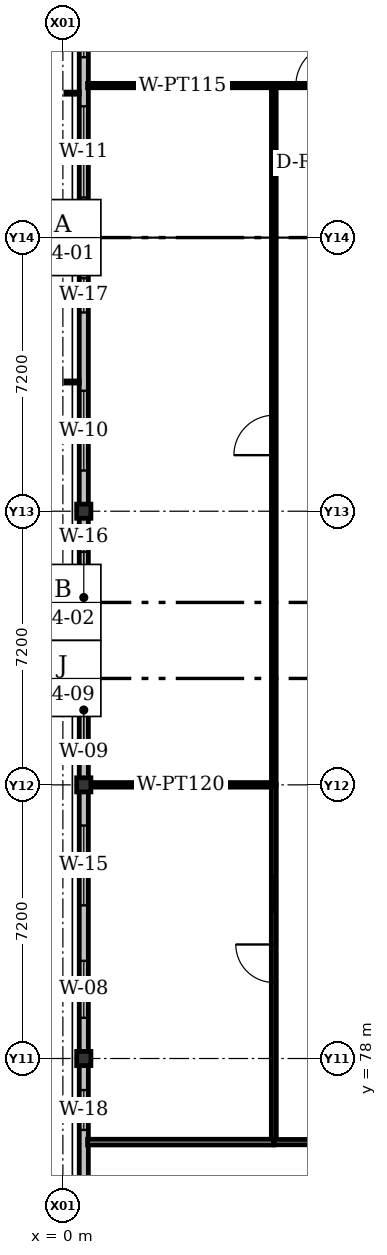
"""IFC4 building model, lengths in metres.
Left out: names, types, materials, properties, quantities, classifications, styles, units other than length and angle.
Written with IfcOpenShell. Run it as: python <this file> out.ifc"""

import sys

from ifc_helpers import new_model, si_unit, direction, frame, frame_2d, origin, origin_2d, place, context, subcontext, project, spatial, rectangle, i_section, extrude, element, fill, save


model = new_model("IFC4")
c1 = context("Model", 3, precision=1e-05, world=origin(), true_north=direction((0.0, 1.0)))
c2 = subcontext(c1, "Body", "Model", "MODEL_VIEW")
j1 = project(units=[si_unit("LENGTHUNIT", "METRE"), si_unit("PLANEANGLEUNIT", "RADIAN")], contexts=[c1])
p1 = place(None, origin())
s1 = spatial("IfcSite", under=j1, at=p1, CompositionType="ELEMENT")
p2 = place(p1, origin())
s2 = spatial("IfcBuilding", under=s1, at=p2, CompositionType="ELEMENT")
p3 = place(p2, frame((0.0, 0.0, 22.5)))
s3 = spatial("IfcBuildingStorey", under=s2, at=p3, CompositionType="ELEMENT", Elevation=22.5)
for number, where, z_axis, x_axis in (
    (1, (0.55, 78.0, 0.0), (0.0, 0.0, 1.0), (1.0, 0.0, 0.0)),
    (2, (0.55, 85.2, 0.0), (0.0, 0.0, 1.0), (1.0, 0.0, 0.0)),
    (3, (0.55, 92.4, 0.0), (0.0, 0.0, 1.0), (1.0, 0.0, 0.0)),
    (4, (0.55, 99.6, 0.0), (0.0, 0.0, 1.0), (1.0, 0.0, 0.0)),
):
    element("IfcColumn", number, at=place(p3, frame(where, z_axis=z_axis, x_axis=x_axis)), inside=s3, PredefinedType="COLUMN", context=c2, shape_type="SweptSolid", body=[
        extrude(i_section(OverallWidth=0.374, OverallDepth=0.372, WebThickness=0.016, FlangeThickness=0.026, FilletRadius=0.015, at=origin_2d()), origin(), (0.0, 0.0, 1.0), 4.2),
    ])
p4 = place(p3, frame((0.55, 70.5, 0.0), z_axis=(0.0, 0.0, 1.0), x_axis=(0.0, 1.0, 0.0)))
e5 = element("IfcWall", 5, at=p4, inside=s3, PredefinedType="SOLIDWALL", context=c2, shape_type="SweptSolid", body=[
    extrude(rectangle(XDim=7.5, YDim=0.24, at=frame_2d((3.75, 0.0))), origin(), (0.0, 0.0, 1.0), 3.557),
])
p5 = place(p4, frame((2.305, 0.0, 0.92)))
e6 = element("IfcOpeningElement", 6, at=p5, cuts=e5, PredefinedType="OPENING", context=c2, shape_type="SweptSolid", body=[
    extrude(rectangle(XDim=1.2, YDim=1.55, at=frame_2d((0.6, 0.775))), frame((0.0, 0.12, 0.0), z_axis=(0.0, -1.0, 0.0), x_axis=(1.0, 0.0, 0.0)), (0.0, 0.0, 1.0), 0.24),
])
p6 = place(p4, frame((5.62, 0.0, 0.92)))
e7 = element("IfcOpeningElement", 7, at=p6, cuts=e5, PredefinedType="OPENING", context=c2, shape_type="SweptSolid", body=[
    extrude(rectangle(XDim=1.05, YDim=1.3, at=frame_2d((0.525, 0.65))), frame((0.0, 0.12, 0.0), z_axis=(0.0, -1.0, 0.0), x_axis=(1.0, 0.0, 0.0)), (0.0, 0.0, 1.0), 0.24),
])
p7 = place(p3, frame((0.55, 78.0, 0.0), z_axis=(0.0, 0.0, 1.0), x_axis=(0.0, 1.0, 0.0)))
e8 = element("IfcWall", 8, at=p7, inside=s3, PredefinedType="SOLIDWALL", context=c2, shape_type="SweptSolid", body=[
    extrude(rectangle(XDim=7.2, YDim=0.24, at=frame_2d((3.6, 0.0))), origin(), (0.0, 0.0, 1.0), 3.557),
])
p8 = place(p7, frame((1.07, 0.0, 0.92)))
e9 = element("IfcOpeningElement", 9, at=p8, cuts=e8, PredefinedType="OPENING", context=c2, shape_type="SweptSolid", body=[
    extrude(rectangle(XDim=1.5, YDim=1.55, at=frame_2d((0.75, 0.775))), frame((0.0, 0.12, 0.0), z_axis=(0.0, -1.0, 0.0), x_axis=(1.0, 0.0, 0.0)), (0.0, 0.0, 1.0), 0.24),
])
p9 = place(p7, frame((4.03, 0.0, 0.92)))
e10 = element("IfcOpeningElement", 10, at=p9, cuts=e8, PredefinedType="OPENING", context=c2, shape_type="SweptSolid", body=[
    extrude(rectangle(XDim=2.1, YDim=1.7, at=frame_2d((1.05, 0.85))), frame((0.0, 0.12, 0.0), z_axis=(0.0, -1.0, 0.0), x_axis=(1.0, 0.0, 0.0)), (0.0, 0.0, 1.0), 0.24),
])
p10 = place(p3, frame((0.55, 85.2, 0.0), z_axis=(0.0, 0.0, 1.0), x_axis=(0.0, 1.0, 0.0)))
e11 = element("IfcWall", 11, at=p10, inside=s3, PredefinedType="SOLIDWALL", context=c2, shape_type="SweptSolid", body=[
    extrude(rectangle(XDim=7.2, YDim=0.24, at=frame_2d((3.6, 0.0))), origin(), (0.0, 0.0, 1.0), 3.557),
])
p11 = place(p10, frame((1.07, 0.0, 0.92)))
e12 = element("IfcOpeningElement", 12, at=p11, cuts=e11, PredefinedType="OPENING", context=c2, shape_type="SweptSolid", body=[
    extrude(rectangle(XDim=1.8, YDim=1.55, at=frame_2d((0.9, 0.775))), frame((0.0, 0.12, 0.0), z_axis=(0.0, -1.0, 0.0), x_axis=(1.0, 0.0, 0.0)), (0.0, 0.0, 1.0), 0.24),
])
p12 = place(p10, frame((3.73, 0.0, 0.92)))
e13 = element("IfcOpeningElement", 13, at=p12, cuts=e11, PredefinedType="OPENING", context=c2, shape_type="SweptSolid", body=[
    extrude(rectangle(XDim=2.4, YDim=1.7, at=frame_2d((1.2, 0.85))), frame((0.0, 0.12, 0.0), z_axis=(0.0, -1.0, 0.0), x_axis=(1.0, 0.0, 0.0)), (0.0, 0.0, 1.0), 0.24),
])
p13 = place(p3, frame((0.55, 92.4, 0.0), z_axis=(0.0, 0.0, 1.0), x_axis=(0.0, 1.0, 0.0)))
e14 = element("IfcWall", 14, at=p13, inside=s3, PredefinedType="SOLIDWALL", context=c2, shape_type="SweptSolid", body=[
    extrude(rectangle(XDim=7.2, YDim=0.24, at=frame_2d((3.6, 0.0))), origin(), (0.0, 0.0, 1.0), 3.557),
])
p14 = place(p13, frame((1.07, 0.0, 0.92)))
e15 = element("IfcOpeningElement", 15, at=p14, cuts=e14, PredefinedType="OPENING", context=c2, shape_type="SweptSolid", body=[
    extrude(rectangle(XDim=2.1, YDim=1.55, at=frame_2d((1.05, 0.775))), frame((0.0, 0.12, 0.0), z_axis=(0.0, -1.0, 0.0), x_axis=(1.0, 0.0, 0.0)), (0.0, 0.0, 1.0), 0.24),
])
p15 = place(p13, frame((5.23, 0.0, 0.92)))
e16 = element("IfcOpeningElement", 16, at=p15, cuts=e14, PredefinedType="OPENING", context=c2, shape_type="SweptSolid", body=[
    extrude(rectangle(XDim=0.9, YDim=1.3, at=frame_2d((0.45, 0.65))), frame((0.0, 0.12, 0.0), z_axis=(0.0, -1.0, 0.0), x_axis=(1.0, 0.0, 0.0)), (0.0, 0.0, 1.0), 0.24),
])
p16 = place(p3, frame((0.55, 99.6, 0.0), z_axis=(0.0, 0.0, 1.0), x_axis=(0.0, 1.0, 0.0)))
e17 = element("IfcWall", 17, at=p16, inside=s3, PredefinedType="SOLIDWALL", context=c2, shape_type="SweptSolid", body=[
    extrude(rectangle(XDim=7.2, YDim=0.24, at=frame_2d((3.6, 0.0))), origin(), (0.0, 0.0, 1.0), 3.557),
])
p17 = place(p16, frame((1.055, 0.0, 0.92)))
e18 = element("IfcOpeningElement", 18, at=p17, cuts=e17, PredefinedType="OPENING", context=c2, shape_type="SweptSolid", body=[
    extrude(rectangle(XDim=2.4, YDim=1.55, at=frame_2d((1.2, 0.775))), frame((0.0, 0.12, 0.0), z_axis=(0.0, -1.0, 0.0), x_axis=(1.0, 0.0, 0.0)), (0.0, 0.0, 1.0), 0.24),
])
p18 = place(p16, frame((4.745, 0.0, 0.92)))
e19 = element("IfcOpeningElement", 19, at=p18, cuts=e17, PredefinedType="OPENING", context=c2, shape_type="SweptSolid", body=[
    extrude(rectangle(XDim=1.2, YDim=1.4, at=frame_2d((0.6, 0.7))), frame((0.0, 0.12, 0.0), z_axis=(0.0, -1.0, 0.0), x_axis=(1.0, 0.0, 0.0)), (0.0, 0.0, 1.0), 0.24),
])
p19 = place(p3, frame((5.55, 75.8, 0.0), z_axis=(0.0, 0.0, 1.0), x_axis=(0.0, 1.0, 0.0)))
e20 = element("IfcWall", 20, at=p19, inside=s3, PredefinedType="PARTITIONING", context=c2, shape_type="SweptSolid", body=[
    extrude(rectangle(XDim=9.4, YDim=0.13, at=frame_2d((4.7, 0.0))), origin(), (0.0, 0.0, 1.0), 3.277),
])
p20 = place(p19, frame((4.2, 0.0, 0.0)))
e21 = element("IfcOpeningElement", 21, at=p20, cuts=e20, PredefinedType="OPENING", context=c2, shape_type="SweptSolid", body=[
    extrude(rectangle(XDim=1.0, YDim=2.2, at=frame_2d((0.5, 1.1))), frame((0.0, 0.065, 0.0), z_axis=(0.0, -1.0, 0.0), x_axis=(1.0, 0.0, 0.0)), (0.0, 0.0, 1.0), 0.13),
])
p21 = place(p19, frame((6.05, 0.0, 0.92)))
e22 = element("IfcOpeningElement", 22, at=p21, cuts=e20, PredefinedType="OPENING", context=c2, shape_type="SweptSolid", body=[
    extrude(rectangle(XDim=0.95, YDim=1.1, at=frame_2d((0.475, 0.55))), frame((0.0, 0.065, 0.0), z_axis=(0.0, -1.0, 0.0), x_axis=(1.0, 0.0, 0.0)), (0.0, 0.0, 1.0), 0.13),
])
p22 = place(p3, frame((5.55, 85.2, 0.0), z_axis=(0.0, 0.0, 1.0), x_axis=(0.0, 1.0, 0.0)))
e23 = element("IfcWall", 23, at=p22, inside=s3, PredefinedType="PARTITIONING", context=c2, shape_type="SweptSolid", body=[
    extrude(rectangle(XDim=18.4, YDim=0.125, at=frame_2d((9.2, 0.0))), origin(), (0.0, 0.0, 1.0), 3.277),
])
p23 = place(p22, frame((8.675, 0.0, 0.0)))
e24 = element("IfcOpeningElement", 24, at=p23, cuts=e23, PredefinedType="OPENING", context=c2, shape_type="SweptSolid", body=[
    extrude(rectangle(XDim=1.05, YDim=2.2, at=frame_2d((0.525, 1.1))), frame((0.0, 0.062, 0.0), z_axis=(0.0, -1.0, 0.0), x_axis=(1.0, 0.0, 0.0)), (0.0, 0.0, 1.0), 0.125),
])
p24 = place(p22, frame((10.575, 0.0, 0.92)))
e25 = element("IfcOpeningElement", 25, at=p24, cuts=e23, PredefinedType="OPENING", context=c2, shape_type="SweptSolid", body=[
    extrude(rectangle(XDim=1.1, YDim=1.1, at=frame_2d((0.55, 0.55))), frame((0.0, 0.062, 0.0), z_axis=(0.0, -1.0, 0.0), x_axis=(1.0, 0.0, 0.0)), (0.0, 0.0, 1.0), 0.125),
])
p25 = place(p3, frame((0.65, 85.2, 0.0), z_axis=(0.0, 0.0, 1.0), x_axis=(1.0, 0.0, 0.0)))
e26 = element("IfcWall", 26, at=p25, inside=s3, PredefinedType="PARTITIONING", context=c2, shape_type="SweptSolid", body=[
    extrude(rectangle(XDim=4.9, YDim=0.12, at=frame_2d((2.45, 0.0))), origin(), (0.0, 0.0, 1.0), 3.277),
])
p26 = place(p3, frame((0.65, 103.6, 0.0), z_axis=(0.0, 0.0, 1.0), x_axis=(1.0, 0.0, 0.0)))
e27 = element("IfcWall", 27, at=p26, inside=s3, PredefinedType="PARTITIONING", context=c2, shape_type="SweptSolid", body=[
    extrude(rectangle(XDim=7.2, YDim=0.115, at=frame_2d((3.6, 0.0))), origin(), (0.0, 0.0, 1.0), 3.507),
])
p27 = place(p26, frame((5.48, 0.0, 0.0)))
e28 = element("IfcOpeningElement", 28, at=p27, cuts=e27, PredefinedType="OPENING", context=c2, shape_type="SweptSolid", body=[
    extrude(rectangle(XDim=1.1, YDim=2.2, at=frame_2d((0.55, 1.1))), frame((0.0, 0.058, 0.0), z_axis=(0.0, -1.0, 0.0), x_axis=(1.0, 0.0, 0.0)), (0.0, 0.0, 1.0), 0.115),
])
p28 = place(p3, frame((0.65, 75.8, 0.0), z_axis=(0.0, 0.0, 1.0), x_axis=(1.0, 0.0, 0.0)))
e29 = element("IfcWall", 29, at=p28, inside=s3, PredefinedType="PARTITIONING", context=c2, shape_type="SweptSolid", body=[
    extrude(rectangle(XDim=4.9, YDim=0.15, at=frame_2d((2.45, 0.0))), origin(), (0.0, 0.0, 1.0), 3.95),
])
p29 = place(p3, frame((19.75, 75.8, 0.0), z_axis=(0.0, 0.0, 1.0), x_axis=(-1.0, 0.0, 0.0)))
e30 = element("IfcWall", 30, at=p29, inside=s3, PredefinedType="PARTITIONING", context=c2, shape_type="SweptSolid", body=[
    extrude(rectangle(XDim=14.2, YDim=0.14, at=frame_2d((7.1, 0.0))), origin(), (0.0, 0.0, 1.0), 3.507),
])
p30 = place(p29, frame((8.02, 0.0, 0.0)))
e31 = element("IfcOpeningElement", 31, at=p30, cuts=e30, PredefinedType="OPENING", context=c2, shape_type="SweptSolid", body=[
    extrude(rectangle(XDim=1.06, YDim=2.25, at=frame_2d((0.53, 1.125))), frame((0.0, 0.07, 0.0), z_axis=(0.0, -1.0, 0.0), x_axis=(1.0, 0.0, 0.0)), (0.0, 0.0, 1.0), 0.14),
])
p31 = place(p29, frame((9.93, 0.0, 0.92)))
e32 = element("IfcOpeningElement", 32, at=p31, cuts=e30, PredefinedType="OPENING", context=c2, shape_type="SweptSolid", body=[
    extrude(rectangle(XDim=0.9, YDim=1.2, at=frame_2d((0.45, 0.6))), frame((0.0, 0.07, 0.0), z_axis=(0.0, -1.0, 0.0), x_axis=(1.0, 0.0, 0.0)), (0.0, 0.0, 1.0), 0.14),
])
p32 = place(p6, origin())
e33 = element("IfcWindow", 33, at=p32, inside=s3, PartitioningType="SINGLE_PANEL", PredefinedType="WINDOW", context=c2, shape_type="SweptSolid", body=[
    extrude(rectangle(XDim=1.05, YDim=1.3, at=frame_2d((0.525, 0.65))), frame((0.0, 0.03, 0.0), z_axis=(0.0, -1.0, 0.0), x_axis=(1.0, 0.0, 0.0)), (0.0, 0.0, 1.0), 0.06),
])
fill(e7, e33)
p33 = place(p8, origin())
e34 = element("IfcWindow", 34, at=p33, inside=s3, PartitioningType="SINGLE_PANEL", PredefinedType="WINDOW", context=c2, shape_type="SweptSolid", body=[
    extrude(rectangle(XDim=1.5, YDim=1.55, at=frame_2d((0.75, 0.775))), frame((0.0, 0.03, 0.0), z_axis=(0.0, -1.0, 0.0), x_axis=(1.0, 0.0, 0.0)), (0.0, 0.0, 1.0), 0.06),
])
fill(e9, e34)
p34 = place(p9, origin())
e35 = element("IfcWindow", 35, at=p34, inside=s3, PartitioningType="DOUBLE_PANEL_VERTICAL", PredefinedType="WINDOW", context=c2, shape_type="SweptSolid", body=[
    extrude(rectangle(XDim=2.1, YDim=1.7, at=frame_2d((1.05, 0.85))), frame((0.0, 0.03, 0.0), z_axis=(0.0, -1.0, 0.0), x_axis=(1.0, 0.0, 0.0)), (0.0, 0.0, 1.0), 0.06),
])
fill(e10, e35)
p35 = place(p11, origin())
e36 = element("IfcWindow", 36, at=p35, inside=s3, PartitioningType="DOUBLE_PANEL_VERTICAL", PredefinedType="WINDOW", context=c2, shape_type="SweptSolid", body=[
    extrude(rectangle(XDim=1.8, YDim=1.55, at=frame_2d((0.9, 0.775))), frame((0.0, 0.03, 0.0), z_axis=(0.0, -1.0, 0.0), x_axis=(1.0, 0.0, 0.0)), (0.0, 0.0, 1.0), 0.06),
])
fill(e12, e36)
p36 = place(p12, origin())
e37 = element("IfcWindow", 37, at=p36, inside=s3, PartitioningType="DOUBLE_PANEL_VERTICAL", PredefinedType="WINDOW", context=c2, shape_type="SweptSolid", body=[
    extrude(rectangle(XDim=2.4, YDim=1.7, at=frame_2d((1.2, 0.85))), frame((0.0, 0.03, 0.0), z_axis=(0.0, -1.0, 0.0), x_axis=(1.0, 0.0, 0.0)), (0.0, 0.0, 1.0), 0.06),
])
fill(e13, e37)
p37 = place(p14, origin())
e38 = element("IfcWindow", 38, at=p37, inside=s3, PartitioningType="DOUBLE_PANEL_VERTICAL", PredefinedType="WINDOW", context=c2, shape_type="SweptSolid", body=[
    extrude(rectangle(XDim=2.1, YDim=1.55, at=frame_2d((1.05, 0.775))), frame((0.0, 0.03, 0.0), z_axis=(0.0, -1.0, 0.0), x_axis=(1.0, 0.0, 0.0)), (0.0, 0.0, 1.0), 0.06),
])
fill(e15, e38)
p38 = place(p15, origin())
e39 = element("IfcWindow", 39, at=p38, inside=s3, PartitioningType="SINGLE_PANEL", PredefinedType="WINDOW", context=c2, shape_type="SweptSolid", body=[
    extrude(rectangle(XDim=0.9, YDim=1.3, at=frame_2d((0.45, 0.65))), frame((0.0, 0.03, 0.0), z_axis=(0.0, -1.0, 0.0), x_axis=(1.0, 0.0, 0.0)), (0.0, 0.0, 1.0), 0.06),
])
fill(e16, e39)
p39 = place(p17, origin())
e40 = element("IfcWindow", 40, at=p39, inside=s3, PartitioningType="DOUBLE_PANEL_VERTICAL", PredefinedType="WINDOW", context=c2, shape_type="SweptSolid", body=[
    extrude(rectangle(XDim=2.4, YDim=1.55, at=frame_2d((1.2, 0.775))), frame((0.0, 0.03, 0.0), z_axis=(0.0, -1.0, 0.0), x_axis=(1.0, 0.0, 0.0)), (0.0, 0.0, 1.0), 0.06),
])
fill(e18, e40)
p40 = place(p18, origin())
e41 = element("IfcWindow", 41, at=p40, inside=s3, PartitioningType="SINGLE_PANEL", PredefinedType="WINDOW", context=c2, shape_type="SweptSolid", body=[
    extrude(rectangle(XDim=1.2, YDim=1.4, at=frame_2d((0.6, 0.7))), frame((0.0, 0.03, 0.0), z_axis=(0.0, -1.0, 0.0), x_axis=(1.0, 0.0, 0.0)), (0.0, 0.0, 1.0), 0.06),
])
fill(e19, e41)
p41 = place(p20, origin())
e42 = element("IfcDoor", 42, at=p41, inside=s3, OperationType="SINGLE_SWING_RIGHT", PredefinedType="DOOR", context=c2, shape_type="SweptSolid", body=[
    extrude(rectangle(XDim=1.0, YDim=2.2, at=frame_2d((0.5, 1.1))), frame((0.0, 0.025, 0.0), z_axis=(0.0, -1.0, 0.0), x_axis=(1.0, 0.0, 0.0)), (0.0, 0.0, 1.0), 0.05),
])
fill(e21, e42)
p42 = place(p21, origin())
e43 = element("IfcWindow", 43, at=p42, inside=s3, PartitioningType="SINGLE_PANEL", PredefinedType="WINDOW", context=c2, shape_type="SweptSolid", body=[
    extrude(rectangle(XDim=0.95, YDim=1.1, at=frame_2d((0.475, 0.55))), frame((0.0, 0.03, 0.0), z_axis=(0.0, -1.0, 0.0), x_axis=(1.0, 0.0, 0.0)), (0.0, 0.0, 1.0), 0.06),
])
fill(e22, e43)
p43 = place(p23, origin())
e44 = element("IfcDoor", 44, at=p43, inside=s3, OperationType="SINGLE_SWING_LEFT", PredefinedType="DOOR", context=c2, shape_type="SweptSolid", body=[
    extrude(rectangle(XDim=1.05, YDim=2.2, at=frame_2d((0.525, 1.1))), frame((0.0, 0.025, 0.0), z_axis=(0.0, -1.0, 0.0), x_axis=(1.0, 0.0, 0.0)), (0.0, 0.0, 1.0), 0.05),
])
fill(e24, e44)
p44 = place(p24, origin())
e45 = element("IfcWindow", 45, at=p44, inside=s3, PartitioningType="SINGLE_PANEL", PredefinedType="WINDOW", context=c2, shape_type="SweptSolid", body=[
    extrude(rectangle(XDim=1.1, YDim=1.1, at=frame_2d((0.55, 0.55))), frame((0.0, 0.03, 0.0), z_axis=(0.0, -1.0, 0.0), x_axis=(1.0, 0.0, 0.0)), (0.0, 0.0, 1.0), 0.06),
])
fill(e25, e45)
p45 = place(p27, origin())
e46 = element("IfcDoor", 46, at=p45, inside=s3, OperationType="SINGLE_SWING_RIGHT", PredefinedType="DOOR", context=c2, shape_type="SweptSolid", body=[
    extrude(rectangle(XDim=1.1, YDim=2.2, at=frame_2d((0.55, 1.1))), frame((0.0, 0.025, 0.0), z_axis=(0.0, -1.0, 0.0), x_axis=(1.0, 0.0, 0.0)), (0.0, 0.0, 1.0), 0.05),
])
fill(e28, e46)
save(model, sys.argv[1])
